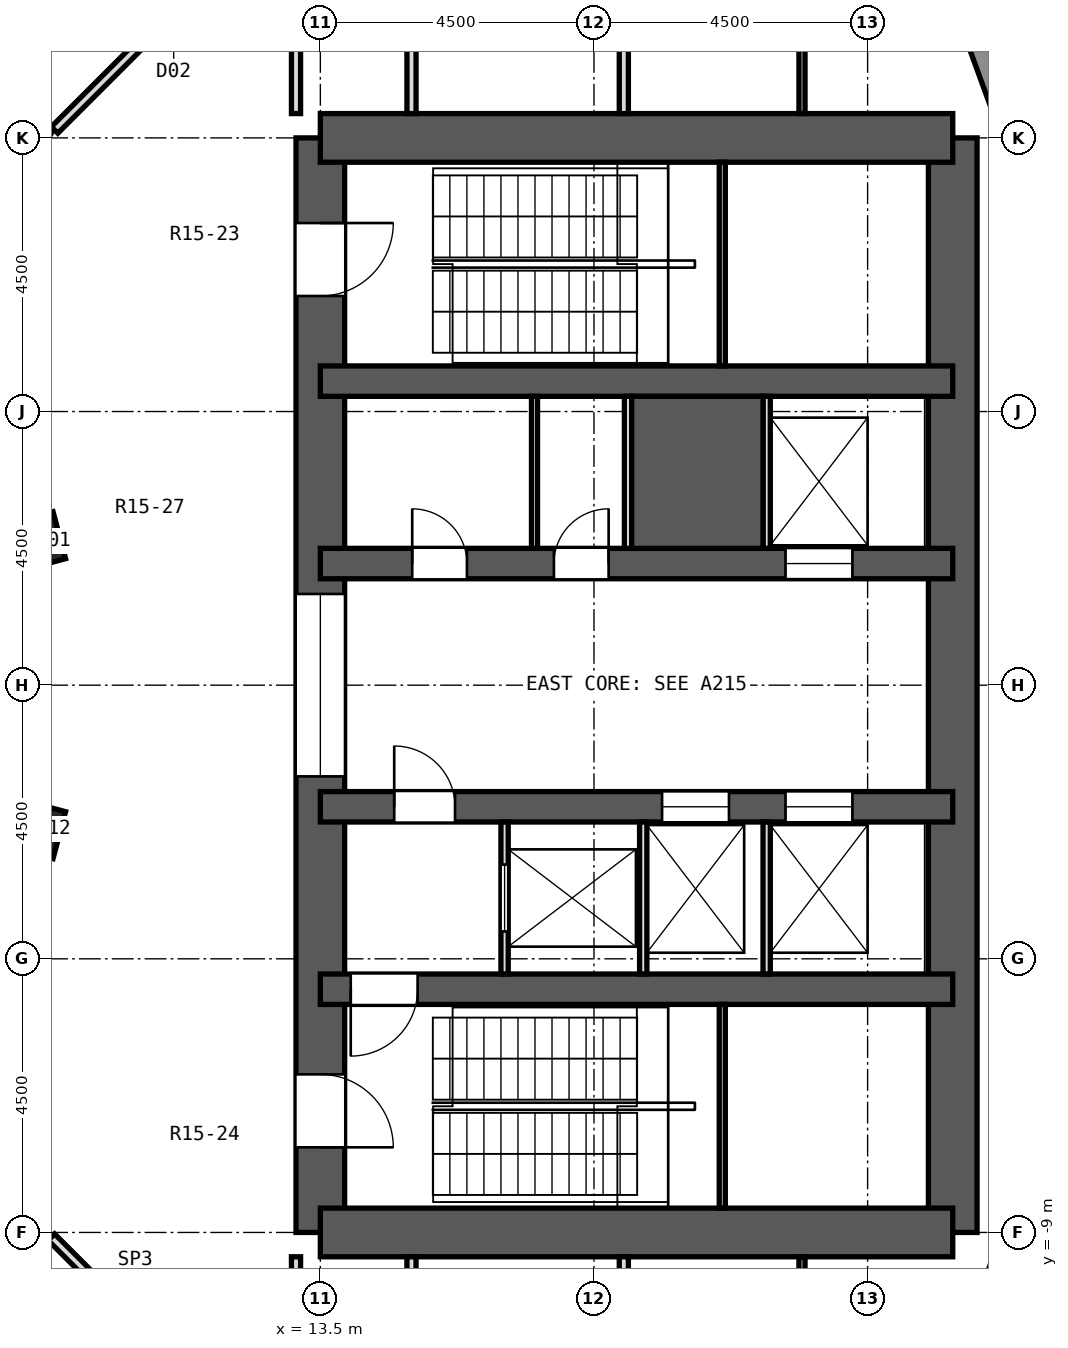
"""IFC4 building model, lengths in metres.
Left out: names, types, materials, properties, quantities, classifications, styles, units other than length and angle.
Written with IfcOpenShell. Run it as: python <this file> out.ifc"""

import sys

from ifc_helpers import new_model, si_unit, direction, frame, frame_2d, origin, origin_2d, place, context, subcontext, project, spatial, rectangle, hollow_rectangle, extrude, element, fill, save


model = new_model("IFC4")
c1 = context("Model", 3, precision=1e-05, world=origin(), true_north=direction((0.0, 1.0)))
c2 = subcontext(c1, "Body", "Model", "MODEL_VIEW")
j1 = project(units=[si_unit("LENGTHUNIT", "METRE"), si_unit("PLANEANGLEUNIT", "RADIAN")], contexts=[c1])
p1 = place(None, origin())
s1 = spatial("IfcSite", under=j1, at=p1, CompositionType="ELEMENT")
p2 = place(p1, origin())
s2 = spatial("IfcBuilding", under=s1, at=p2, CompositionType="ELEMENT")
p3 = place(p2, frame((0.0, 0.0, 82.4)))
s3 = spatial("IfcBuildingStorey", under=s2, at=p3, CompositionType="ELEMENT", Elevation=82.4)
p4 = place(p3, frame((25.467, 11.875, 0.251), z_axis=(-0.454740441916, -0.212028472715, 0.865017373955), x_axis=(0.422584737529, -0.906323418878, 0.0)))
e1 = element("IfcColumn", 1, at=p4, inside=s3, PredefinedType="COLUMN", context=c2, shape_type="SweptSolid", body=[
    extrude(hollow_rectangle(XDim=1.0, YDim=1.0, WallThickness=0.06, at=origin_2d()), origin(), (0.0, 0.0, 1.0), 3.986),
])
for number, where, z_axis, x_axis in (
    (2, (8.821, 2.364, 0.0), (0.0, 0.0, 1.0), (0.966, 0.259, 0.0)),
    (3, (8.821, -2.364, 0.0), (0.0, 0.0, 1.0), (0.966, -0.259, 0.0)),
):
    element("IfcColumn", number, at=place(p3, frame(where, z_axis=z_axis, x_axis=x_axis)), inside=s3, PredefinedType="COLUMN", context=c2, shape_type="SweptSolid", body=[
        extrude(rectangle(XDim=0.8, YDim=0.8, at=origin_2d()), origin(), (0.0, 0.0, 1.0), 4.5),
    ])
p5 = place(p3, frame((13.5, -9.0, 0.0), z_axis=(0.0, 0.0, 1.0), x_axis=(0.0, 1.0, 0.0)))
e4 = element("IfcWall", 4, at=p5, inside=s3, PredefinedType="SHEAR", context=c2, shape_type="SweptSolid", body=[
    extrude(rectangle(XDim=18.0, YDim=0.8, at=frame_2d((9.0, 0.0))), origin(), (0.0, 0.0, 1.0), 4.5),
])
p6 = place(p5, frame((15.4, 0.0, 0.0)))
e5 = element("IfcOpeningElement", 5, at=p6, cuts=e4, PredefinedType="OPENING", context=c2, shape_type="SweptSolid", body=[
    extrude(rectangle(XDim=1.2, YDim=2.1, at=frame_2d((0.6, 1.05))), frame((0.0, 0.412, 0.0), z_axis=(0.0, -1.0, 0.0), x_axis=(1.0, 0.0, 0.0)), (0.0, 0.0, 1.0), 0.824),
])
p7 = place(p5, frame((1.4, 0.0, 0.0)))
e6 = element("IfcOpeningElement", 6, at=p7, cuts=e4, PredefinedType="OPENING", context=c2, shape_type="SweptSolid", body=[
    extrude(rectangle(XDim=1.2, YDim=2.1, at=frame_2d((0.6, 1.05))), frame((0.0, 0.412, 0.0), z_axis=(0.0, -1.0, 0.0), x_axis=(1.0, 0.0, 0.0)), (0.0, 0.0, 1.0), 0.824),
])
p8 = place(p5, frame((7.5, 0.0, 0.0)))
e7 = element("IfcOpeningElement", 7, at=p8, cuts=e4, PredefinedType="OPENING", context=c2, shape_type="SweptSolid", body=[
    extrude(rectangle(XDim=3.0, YDim=2.4, at=frame_2d((1.5, 1.2))), frame((0.0, 0.412, 0.0), z_axis=(0.0, -1.0, 0.0), x_axis=(1.0, 0.0, 0.0)), (0.0, 0.0, 1.0), 0.824),
])
p9 = place(p3, frame((23.9, -9.0, 0.0), z_axis=(0.0, 0.0, 1.0), x_axis=(0.0, 1.0, 0.0)))
e8 = element("IfcWall", 8, at=p9, inside=s3, PredefinedType="SHEAR", context=c2, shape_type="SweptSolid", body=[
    extrude(rectangle(XDim=18.0, YDim=0.8, at=frame_2d((9.0, 0.0))), origin(), (0.0, 0.0, 1.0), 4.5),
])
for number, where, z_axis, x_axis in (
    (9, (13.5, 9.0, 0.0), (0.0, 0.0, 1.0), (1.0, 0.0, 0.0)),
    (10, (13.5, -9.0, 0.0), (0.0, 0.0, 1.0), (1.0, 0.0, 0.0)),
):
    element("IfcWall", number, at=place(p3, frame(where, z_axis=z_axis, x_axis=x_axis)), inside=s3, PredefinedType="SHEAR", context=c2, shape_type="SweptSolid", body=[
        extrude(rectangle(XDim=10.4, YDim=0.8, at=frame_2d((5.2, 0.0))), origin(), (0.0, 0.0, 1.0), 4.5),
    ])
p10 = place(p3, frame((13.5, 5.0, 0.0), z_axis=(0.0, 0.0, 1.0), x_axis=(1.0, 0.0, 0.0)))
e11 = element("IfcWall", 11, at=p10, inside=s3, PredefinedType="SHEAR", context=c2, shape_type="SweptSolid", body=[
    extrude(rectangle(XDim=10.4, YDim=0.5, at=frame_2d((5.2, 0.0))), origin(), (0.0, 0.0, 1.0), 4.5),
])
p11 = place(p3, frame((13.5, -5.0, 0.0), z_axis=(0.0, 0.0, 1.0), x_axis=(1.0, 0.0, 0.0)))
e12 = element("IfcWall", 12, at=p11, inside=s3, PredefinedType="SHEAR", context=c2, shape_type="SweptSolid", body=[
    extrude(rectangle(XDim=10.4, YDim=0.5, at=frame_2d((5.2, 0.0))), origin(), (0.0, 0.0, 1.0), 4.5),
])
p12 = place(p11, frame((0.5, 0.0, 0.0)))
e13 = element("IfcOpeningElement", 13, at=p12, cuts=e12, PredefinedType="OPENING", context=c2, shape_type="SweptSolid", body=[
    extrude(rectangle(XDim=1.1, YDim=2.1, at=frame_2d((0.55, 1.05))), frame((0.0, 0.262, 0.0), z_axis=(0.0, -1.0, 0.0), x_axis=(1.0, 0.0, 0.0)), (0.0, 0.0, 1.0), 0.524),
])
p13 = place(p3, frame((13.5, 2.0, 0.0), z_axis=(0.0, 0.0, 1.0), x_axis=(1.0, 0.0, 0.0)))
e14 = element("IfcWall", 14, at=p13, inside=s3, PredefinedType="SHEAR", context=c2, shape_type="SweptSolid", body=[
    extrude(rectangle(XDim=10.4, YDim=0.5, at=frame_2d((5.2, 0.0))), origin(), (0.0, 0.0, 1.0), 4.5),
])
p14 = place(p13, frame((7.65, 0.0, 0.0)))
e15 = element("IfcOpeningElement", 15, at=p14, cuts=e14, PredefinedType="OPENING", context=c2, shape_type="SweptSolid", body=[
    extrude(rectangle(XDim=1.1, YDim=2.1, at=frame_2d((0.55, 1.05))), frame((0.0, 0.262, 0.0), z_axis=(0.0, -1.0, 0.0), x_axis=(1.0, 0.0, 0.0)), (0.0, 0.0, 1.0), 0.524),
])
p15 = place(p13, frame((1.511, 0.0, 0.0)))
e16 = element("IfcOpeningElement", 16, at=p15, cuts=e14, PredefinedType="OPENING", context=c2, shape_type="SweptSolid", body=[
    extrude(rectangle(XDim=0.9, YDim=2.1, at=frame_2d((0.45, 1.05))), frame((0.0, 0.262, 0.0), z_axis=(0.0, -1.0, 0.0), x_axis=(1.0, 0.0, 0.0)), (0.0, 0.0, 1.0), 0.524),
])
p16 = place(p13, frame((3.841, 0.0, 0.0)))
e17 = element("IfcOpeningElement", 17, at=p16, cuts=e14, PredefinedType="OPENING", context=c2, shape_type="SweptSolid", body=[
    extrude(rectangle(XDim=0.9, YDim=2.1, at=frame_2d((0.45, 1.05))), frame((0.0, 0.262, 0.0), z_axis=(0.0, -1.0, 0.0), x_axis=(1.0, 0.0, 0.0)), (0.0, 0.0, 1.0), 0.524),
])
p17 = place(p3, frame((13.5, -2.0, 0.0), z_axis=(0.0, 0.0, 1.0), x_axis=(1.0, 0.0, 0.0)))
e18 = element("IfcWall", 18, at=p17, inside=s3, PredefinedType="SHEAR", context=c2, shape_type="SweptSolid", body=[
    extrude(rectangle(XDim=10.4, YDim=0.5, at=frame_2d((5.2, 0.0))), origin(), (0.0, 0.0, 1.0), 4.5),
])
p18 = place(p17, frame((5.62, 0.0, 0.0)))
e19 = element("IfcOpeningElement", 19, at=p18, cuts=e18, PredefinedType="OPENING", context=c2, shape_type="SweptSolid", body=[
    extrude(rectangle(XDim=1.1, YDim=2.1, at=frame_2d((0.55, 1.05))), frame((0.0, 0.262, 0.0), z_axis=(0.0, -1.0, 0.0), x_axis=(1.0, 0.0, 0.0)), (0.0, 0.0, 1.0), 0.524),
])
p19 = place(p17, frame((7.65, 0.0, 0.0)))
e20 = element("IfcOpeningElement", 20, at=p19, cuts=e18, PredefinedType="OPENING", context=c2, shape_type="SweptSolid", body=[
    extrude(rectangle(XDim=1.1, YDim=2.1, at=frame_2d((0.55, 1.05))), frame((0.0, 0.262, 0.0), z_axis=(0.0, -1.0, 0.0), x_axis=(1.0, 0.0, 0.0)), (0.0, 0.0, 1.0), 0.524),
])
p20 = place(p17, frame((1.215, 0.0, 0.0)))
e21 = element("IfcOpeningElement", 21, at=p20, cuts=e18, PredefinedType="OPENING", context=c2, shape_type="SweptSolid", body=[
    extrude(rectangle(XDim=1.0, YDim=2.1, at=frame_2d((0.5, 1.05))), frame((0.0, 0.262, 0.0), z_axis=(0.0, -1.0, 0.0), x_axis=(1.0, 0.0, 0.0)), (0.0, 0.0, 1.0), 0.524),
])
for number, where, z_axis, x_axis in (
    (22, (25.608, 7.406, 0.0), (0.0, 0.0, 1.0), (-0.342, 0.94, 0.0)),
    (23, (24.378, -10.787, 0.0), (0.0, 0.0, 1.0), (0.342, 0.94, 0.0)),
):
    element("IfcWall", number, at=place(p3, frame(where, z_axis=z_axis, x_axis=x_axis)), inside=s3, PredefinedType="SOLIDWALL", context=c2, shape_type="SweptSolid", body=[
        extrude(rectangle(XDim=3.598, YDim=0.6, at=frame_2d((1.799, 0.0))), origin(), (0.0, 0.0, 1.0), 3.95),
    ])
p21 = place(p3, frame((9.077, -9.077, 0.0), z_axis=(0.0, 0.0, 1.0), x_axis=(0.707106781187, -0.707106781187, 0.0)))
e24 = element("IfcWall", 24, at=p21, inside=s3, PredefinedType="PARTITIONING", context=c2, shape_type="SweptSolid", body=[
    extrude(rectangle(XDim=5.65, YDim=0.15, at=frame_2d((2.825, 0.0))), origin(), (0.0, 0.0, 1.0), 3.95),
])
p22 = place(p21, frame((2.345, 0.0, 0.0)))
e25 = element("IfcOpeningElement", 25, at=p22, cuts=e24, PredefinedType="OPENING", context=c2, shape_type="SweptSolid", body=[
    extrude(rectangle(XDim=1.0, YDim=2.1, at=frame_2d((0.5, 1.05))), frame((0.0, 0.087, 0.0), z_axis=(0.0, -1.0, 0.0), x_axis=(1.0, 0.0, 0.0)), (0.0, 0.0, 1.0), 0.174),
])
p23 = place(p3, frame((3.323, 12.4, 0.0), z_axis=(0.0, 0.0, 1.0), x_axis=(0.865961614908, -0.500110469302, 0.0)))
e26 = element("IfcWall", 26, at=p23, inside=s3, PredefinedType="PARTITIONING", context=c2, shape_type="SweptSolid", body=[
    extrude(rectangle(XDim=6.645, YDim=0.15, at=frame_2d((3.322, 0.0))), origin(), (0.0, 0.0, 1.0), 3.95),
])
p24 = place(p23, frame((1.604, 0.0, 0.0)))
e27 = element("IfcOpeningElement", 27, at=p24, cuts=e26, PredefinedType="OPENING", context=c2, shape_type="SweptSolid", body=[
    extrude(rectangle(XDim=1.2, YDim=2.1, at=frame_2d((0.6, 1.05))), frame((0.0, 0.087, 0.0), z_axis=(0.0, -1.0, 0.0), x_axis=(1.0, 0.0, 0.0)), (0.0, 0.0, 1.0), 0.174),
])
p25 = place(p3, frame((9.13, 9.13, 0.0), z_axis=(0.0, 0.0, 1.0), x_axis=(0.707106781187, 0.707106781187, 0.0)))
e28 = element("IfcWall", 28, at=p25, inside=s3, PredefinedType="PARTITIONING", context=c2, shape_type="SweptSolid", body=[
    extrude(rectangle(XDim=5.575, YDim=0.15, at=frame_2d((2.787, 0.0))), origin(), (0.0, 0.0, 1.0), 3.95),
])
p26 = place(p25, frame((2.27, 0.0, 0.0)))
e29 = element("IfcOpeningElement", 29, at=p26, cuts=e28, PredefinedType="OPENING", context=c2, shape_type="SweptSolid", body=[
    extrude(rectangle(XDim=1.0, YDim=2.1, at=frame_2d((0.5, 1.05))), frame((0.0, 0.087, 0.0), z_axis=(0.0, -1.0, 0.0), x_axis=(1.0, 0.0, 0.0)), (0.0, 0.0, 1.0), 0.174),
])
p27 = place(p3, frame((7.182, 10.258, 0.0), z_axis=(0.0, 0.0, 1.0), x_axis=(0.573601596314, 0.819134426518, 0.0)))
e30 = element("IfcWall", 30, at=p27, inside=s3, PredefinedType="PARTITIONING", context=c2, shape_type="SweptSolid", body=[
    extrude(rectangle(XDim=13.178, YDim=0.15, at=frame_2d((6.589, 0.0))), origin(), (0.0, 0.0, 1.0), 3.95),
])
for number, where, z_axis, x_axis in (
    (31, (21.421, -14.102, 0.0), (0.0, 0.0, 1.0), (0.0, 1.0, 0.0)),
    (32, (21.421, 9.4, 0.0), (0.0, 0.0, 1.0), (0.0, 1.0, 0.0)),
):
    element("IfcWall", number, at=place(p3, frame(where, z_axis=z_axis, x_axis=x_axis)), inside=s3, PredefinedType="PARTITIONING", context=c2, shape_type="SweptSolid", body=[
        extrude(rectangle(XDim=4.702, YDim=0.1, at=frame_2d((2.351, 0.0))), origin(), (0.0, 0.0, 1.0), 3.95),
    ])
p28 = place(p3, frame((18.491, -17.794, 0.0), z_axis=(0.0, 0.0, 1.0), x_axis=(0.0, 1.0, 0.0)))
e33 = element("IfcWall", 33, at=p28, inside=s3, PredefinedType="PARTITIONING", context=c2, shape_type="SweptSolid", body=[
    extrude(rectangle(XDim=8.394, YDim=0.15, at=frame_2d((4.197, 0.0))), origin(), (0.0, 0.0, 1.0), 3.95),
])
p29 = place(p28, frame((3.264, 0.0, 0.0)))
e34 = element("IfcOpeningElement", 34, at=p29, cuts=e33, PredefinedType="OPENING", context=c2, shape_type="SweptSolid", body=[
    extrude(rectangle(XDim=1.0, YDim=2.1, at=frame_2d((0.5, 1.05))), frame((0.0, 0.087, 0.0), z_axis=(0.0, -1.0, 0.0), x_axis=(1.0, 0.0, 0.0)), (0.0, 0.0, 1.0), 0.174),
])
p30 = place(p3, frame((18.491, 9.4, 0.0), z_axis=(0.0, 0.0, 1.0), x_axis=(0.0, 1.0, 0.0)))
e35 = element("IfcWall", 35, at=p30, inside=s3, PredefinedType="PARTITIONING", context=c2, shape_type="SweptSolid", body=[
    extrude(rectangle(XDim=8.394, YDim=0.15, at=frame_2d((4.197, 0.0))), origin(), (0.0, 0.0, 1.0), 3.95),
])
p31 = place(p30, frame((4.129, 0.0, 0.0)))
e36 = element("IfcOpeningElement", 36, at=p31, cuts=e35, PredefinedType="OPENING", context=c2, shape_type="SweptSolid", body=[
    extrude(rectangle(XDim=1.0, YDim=2.1, at=frame_2d((0.5, 1.05))), frame((0.0, 0.087, 0.0), z_axis=(0.0, -1.0, 0.0), x_axis=(1.0, 0.0, 0.0)), (0.0, 0.0, 1.0), 0.174),
])
p32 = place(p3, frame((14.999, -20.836, 0.0), z_axis=(0.0, 0.0, 1.0), x_axis=(0.0, 1.0, 0.0)))
e37 = element("IfcWall", 37, at=p32, inside=s3, PredefinedType="PARTITIONING", context=c2, shape_type="SweptSolid", body=[
    extrude(rectangle(XDim=11.436, YDim=0.15, at=frame_2d((5.718, 0.0))), origin(), (0.0, 0.0, 1.0), 3.95),
])
p33 = place(p32, frame((1.591, 0.0, 0.0)))
e38 = element("IfcOpeningElement", 38, at=p33, cuts=e37, PredefinedType="OPENING", context=c2, shape_type="SweptSolid", body=[
    extrude(rectangle(XDim=1.0, YDim=2.1, at=frame_2d((0.5, 1.05))), frame((0.0, 0.087, 0.0), z_axis=(0.0, -1.0, 0.0), x_axis=(1.0, 0.0, 0.0)), (0.0, 0.0, 1.0), 0.174),
])
p34 = place(p3, frame((14.999, 9.4, 0.0), z_axis=(0.0, 0.0, 1.0), x_axis=(0.0, 1.0, 0.0)))
e39 = element("IfcWall", 39, at=p34, inside=s3, PredefinedType="PARTITIONING", context=c2, shape_type="SweptSolid", body=[
    extrude(rectangle(XDim=11.436, YDim=0.15, at=frame_2d((5.718, 0.0))), origin(), (0.0, 0.0, 1.0), 3.95),
])
p35 = place(p34, frame((9.545, 0.0, 0.0)))
e40 = element("IfcOpeningElement", 40, at=p35, cuts=e39, PredefinedType="OPENING", context=c2, shape_type="SweptSolid", body=[
    extrude(rectangle(XDim=1.0, YDim=2.1, at=frame_2d((0.5, 1.05))), frame((0.0, 0.087, 0.0), z_axis=(0.0, -1.0, 0.0), x_axis=(1.0, 0.0, 0.0)), (0.0, 0.0, 1.0), 0.174),
])
for number, where, z_axis, x_axis in (
    (41, (13.1, -13.025, 0.0), (0.0, 0.0, 1.0), (0.0, 1.0, 0.0)),
    (42, (13.1, 9.4, 0.0), (0.0, 0.0, 1.0), (0.0, 1.0, 0.0)),
):
    element("IfcWall", number, at=place(p3, frame(where, z_axis=z_axis, x_axis=x_axis)), inside=s3, PredefinedType="PARTITIONING", context=c2, shape_type="SweptSolid", body=[
        extrude(rectangle(XDim=3.625, YDim=0.15, at=frame_2d((1.812, 0.0))), origin(), (0.0, 0.0, 1.0), 3.95),
    ])
p36 = place(p3, frame((17.022, 2.25, 0.0), z_axis=(0.0, 0.0, 1.0), x_axis=(0.0, 1.0, 0.0)))
e43 = element("IfcWall", 43, at=p36, inside=s3, PredefinedType="PARTITIONING", context=c2, shape_type="SweptSolid", body=[
    extrude(rectangle(XDim=2.5, YDim=0.1, at=frame_2d((1.25, 0.0))), origin(), (0.0, 0.0, 1.0), 3.95),
])
for number, where, z_axis, x_axis in (
    (44, (18.56, 2.25, 0.0), (0.0, 0.0, 1.0), (0.0, 1.0, 0.0)),
    (45, (20.84, 2.25, 0.0), (0.0, 0.0, 1.0), (0.0, 1.0, 0.0)),
):
    element("IfcWall", number, at=place(p3, frame(where, z_axis=z_axis, x_axis=x_axis)), inside=s3, PredefinedType="PARTITIONING", context=c2, shape_type="SweptSolid", body=[
        extrude(rectangle(XDim=2.5, YDim=0.12, at=frame_2d((1.25, 0.0))), origin(), (0.0, 0.0, 1.0), 3.95),
    ])
p37 = place(p3, frame((16.53, -4.75, 0.0), z_axis=(0.0, 0.0, 1.0), x_axis=(0.0, 1.0, 0.0)))
e46 = element("IfcWall", 46, at=p37, inside=s3, PredefinedType="PARTITIONING", context=c2, shape_type="SweptSolid", body=[
    extrude(rectangle(XDim=2.5, YDim=0.12, at=frame_2d((1.25, 0.0))), origin(), (0.0, 0.0, 1.0), 3.95),
])
p38 = place(p37, frame((0.7, 0.0, 0.0)))
e47 = element("IfcOpeningElement", 47, at=p38, cuts=e46, PredefinedType="OPENING", context=c2, shape_type="SweptSolid", body=[
    extrude(rectangle(XDim=1.1, YDim=2.1, at=frame_2d((0.55, 1.05))), frame((0.0, 0.072, 0.0), z_axis=(0.0, -1.0, 0.0), x_axis=(1.0, 0.0, 0.0)), (0.0, 0.0, 1.0), 0.144),
])
for number, where, z_axis, x_axis in (
    (48, (18.81, -4.75, 0.0), (0.0, 0.0, 1.0), (0.0, 1.0, 0.0)),
    (49, (20.84, -4.75, 0.0), (0.0, 0.0, 1.0), (0.0, 1.0, 0.0)),
):
    element("IfcWall", number, at=place(p3, frame(where, z_axis=z_axis, x_axis=x_axis)), inside=s3, PredefinedType="PARTITIONING", context=c2, shape_type="SweptSolid", body=[
        extrude(rectangle(XDim=2.5, YDim=0.12, at=frame_2d((1.25, 0.0))), origin(), (0.0, 0.0, 1.0), 3.95),
    ])
for number, where, z_axis, x_axis in (
    (50, (20.11, 5.25, 0.0), (0.0, 0.0, 1.0), (0.0, 1.0, 0.0)),
    (51, (20.11, -8.6, 0.0), (0.0, 0.0, 1.0), (0.0, 1.0, 0.0)),
):
    element("IfcWall", number, at=place(p3, frame(where, z_axis=z_axis, x_axis=x_axis)), inside=s3, PredefinedType="PARTITIONING", context=c2, shape_type="SweptSolid", body=[
        extrude(rectangle(XDim=3.35, YDim=0.1, at=frame_2d((1.675, 0.0))), origin(), (0.0, 0.0, 1.0), 3.95),
    ])
p39 = place(p3, frame((18.62, 3.5, 0.0), z_axis=(0.0, 0.0, 1.0), x_axis=(1.0, 0.0, 0.0)))
e52 = element("IfcWall", 52, at=p39, inside=s3, PredefinedType="SOLIDWALL", context=c2, shape_type="SweptSolid", body=[
    extrude(rectangle(XDim=2.16, YDim=2.5, at=frame_2d((1.08, 0.0))), origin(), (0.0, 0.0, 1.0), 3.1),
])
p40 = place(p14, origin())
e53 = element("IfcDoor", 53, at=p40, inside=s3, OperationType="DOUBLE_DOOR_SLIDING", PredefinedType="DOOR", context=c2, shape_type="SweptSolid", body=[
    extrude(rectangle(XDim=1.1, YDim=2.1, at=frame_2d((0.55, 1.05))), frame((0.0, 0.025, 0.0), z_axis=(0.0, -1.0, 0.0), x_axis=(1.0, 0.0, 0.0)), (0.0, 0.0, 1.0), 0.05),
])
fill(e15, e53)
p41 = place(p38, origin())
e54 = element("IfcDoor", 54, at=p41, inside=s3, OperationType="DOUBLE_DOOR_SLIDING", PredefinedType="DOOR", context=c2, shape_type="SweptSolid", body=[
    extrude(rectangle(XDim=1.1, YDim=2.1, at=frame_2d((0.55, 1.05))), frame((0.0, 0.025, 0.0), z_axis=(0.0, -1.0, 0.0), x_axis=(1.0, 0.0, 0.0)), (0.0, 0.0, 1.0), 0.05),
])
fill(e47, e54)
p42 = place(p18, origin())
e55 = element("IfcDoor", 55, at=p42, inside=s3, OperationType="DOUBLE_DOOR_SLIDING", PredefinedType="DOOR", context=c2, shape_type="SweptSolid", body=[
    extrude(rectangle(XDim=1.1, YDim=2.1, at=frame_2d((0.55, 1.05))), frame((0.0, 0.025, 0.0), z_axis=(0.0, -1.0, 0.0), x_axis=(1.0, 0.0, 0.0)), (0.0, 0.0, 1.0), 0.05),
])
fill(e19, e55)
p43 = place(p19, origin())
e56 = element("IfcDoor", 56, at=p43, inside=s3, OperationType="DOUBLE_DOOR_SLIDING", PredefinedType="DOOR", context=c2, shape_type="SweptSolid", body=[
    extrude(rectangle(XDim=1.1, YDim=2.1, at=frame_2d((0.55, 1.05))), frame((0.0, 0.025, 0.0), z_axis=(0.0, -1.0, 0.0), x_axis=(1.0, 0.0, 0.0)), (0.0, 0.0, 1.0), 0.05),
])
fill(e20, e56)
p44 = place(p15, origin())
e57 = element("IfcDoor", 57, at=p44, inside=s3, OperationType="SINGLE_SWING_LEFT", PredefinedType="DOOR", context=c2, shape_type="SweptSolid", body=[
    extrude(rectangle(XDim=0.9, YDim=2.1, at=frame_2d((0.45, 1.05))), frame((0.0, 0.025, 0.0), z_axis=(0.0, -1.0, 0.0), x_axis=(1.0, 0.0, 0.0)), (0.0, 0.0, 1.0), 0.05),
])
fill(e16, e57)
p45 = place(p16, origin())
e58 = element("IfcDoor", 58, at=p45, inside=s3, OperationType="SINGLE_SWING_RIGHT", PredefinedType="DOOR", context=c2, shape_type="SweptSolid", body=[
    extrude(rectangle(XDim=0.9, YDim=2.1, at=frame_2d((0.45, 1.05))), frame((0.0, 0.025, 0.0), z_axis=(0.0, -1.0, 0.0), x_axis=(1.0, 0.0, 0.0)), (0.0, 0.0, 1.0), 0.05),
])
fill(e17, e58)
p46 = place(p20, origin())
e59 = element("IfcDoor", 59, at=p46, inside=s3, OperationType="SINGLE_SWING_LEFT", PredefinedType="DOOR", context=c2, shape_type="SweptSolid", body=[
    extrude(rectangle(XDim=1.0, YDim=2.1, at=frame_2d((0.5, 1.05))), frame((0.0, 0.025, 0.0), z_axis=(0.0, -1.0, 0.0), x_axis=(1.0, 0.0, 0.0)), (0.0, 0.0, 1.0), 0.05),
])
fill(e21, e59)
p47 = place(p12, frame((1.1, 0.0, 0.0), z_axis=(0.0, 0.0, 1.0), x_axis=(-1.0, 0.0, 0.0)))
e60 = element("IfcDoor", 60, at=p47, inside=s3, OperationType="SINGLE_SWING_RIGHT", PredefinedType="DOOR", context=c2, shape_type="SweptSolid", body=[
    extrude(rectangle(XDim=1.1, YDim=2.1, at=frame_2d((0.55, 1.05))), frame((0.0, 0.025, 0.0), z_axis=(0.0, -1.0, 0.0), x_axis=(1.0, 0.0, 0.0)), (0.0, 0.0, 1.0), 0.05),
])
fill(e13, e60)
p48 = place(p6, frame((1.2, 0.0, 0.0), z_axis=(0.0, 0.0, 1.0), x_axis=(-1.0, 0.0, 0.0)))
e61 = element("IfcDoor", 61, at=p48, inside=s3, OperationType="SINGLE_SWING_LEFT", PredefinedType="DOOR", context=c2, shape_type="SweptSolid", body=[
    extrude(rectangle(XDim=1.2, YDim=2.1, at=frame_2d((0.6, 1.05))), frame((0.0, 0.025, 0.0), z_axis=(0.0, -1.0, 0.0), x_axis=(1.0, 0.0, 0.0)), (0.0, 0.0, 1.0), 0.05),
])
fill(e5, e61)
p49 = place(p7, frame((1.2, 0.0, 0.0), z_axis=(0.0, 0.0, 1.0), x_axis=(-1.0, 0.0, 0.0)))
e62 = element("IfcDoor", 62, at=p49, inside=s3, OperationType="SINGLE_SWING_RIGHT", PredefinedType="DOOR", context=c2, shape_type="SweptSolid", body=[
    extrude(rectangle(XDim=1.2, YDim=2.1, at=frame_2d((0.6, 1.05))), frame((0.0, 0.025, 0.0), z_axis=(0.0, -1.0, 0.0), x_axis=(1.0, 0.0, 0.0)), (0.0, 0.0, 1.0), 0.05),
])
fill(e6, e62)
p50 = place(p8, origin())
e63 = element("IfcDoor", 63, at=p50, inside=s3, OperationType="DOUBLE_DOOR_SLIDING", PredefinedType="DOOR", context=c2, shape_type="SweptSolid", body=[
    extrude(rectangle(XDim=3.0, YDim=2.4, at=frame_2d((1.5, 1.2))), frame((0.0, 0.025, 0.0), z_axis=(0.0, -1.0, 0.0), x_axis=(1.0, 0.0, 0.0)), (0.0, 0.0, 1.0), 0.05),
])
fill(e7, e63)
save(model, sys.argv[1])
